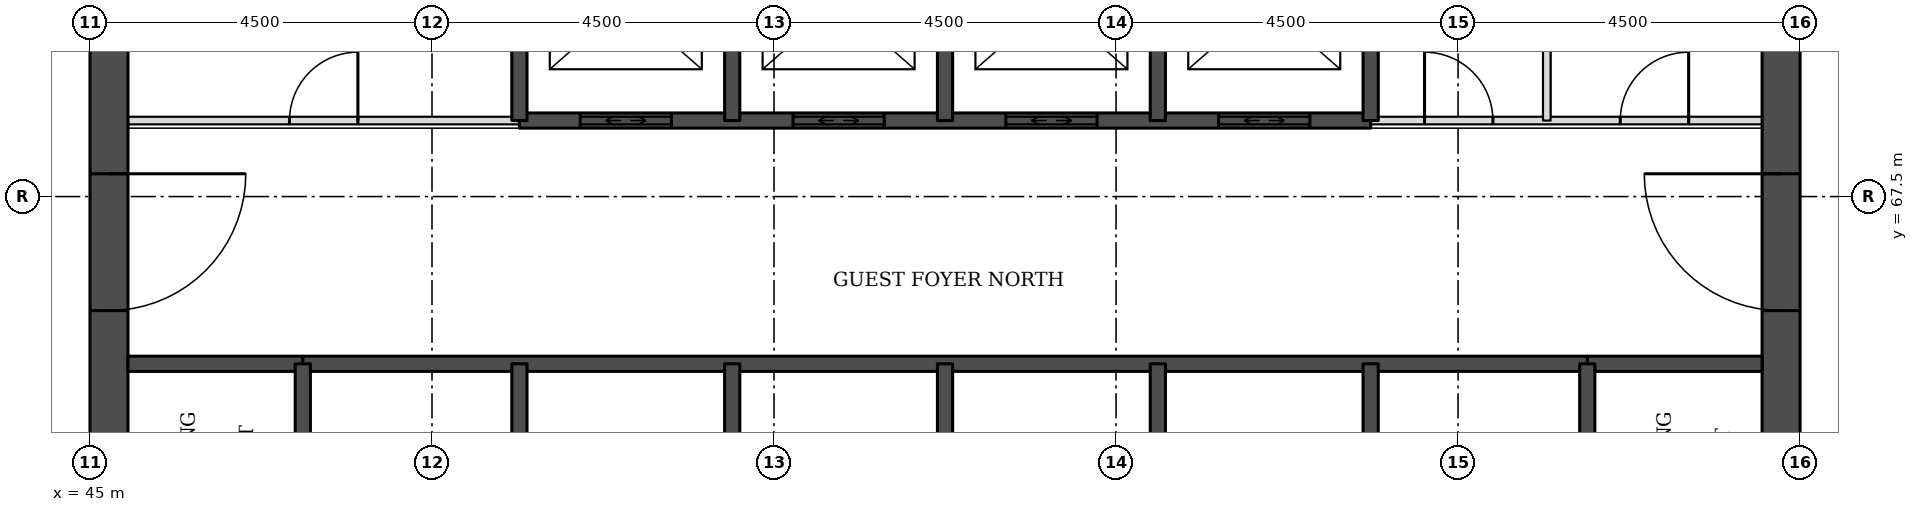
"""IFC4 building model, lengths in metres.
Left out: names, types, materials, properties, quantities, classifications, styles, units other than length and angle.
Written with IfcOpenShell. Run it as: python <this file> out.ifc"""

import sys

from ifc_helpers import new_model, si_unit, direction, frame, frame_2d, origin, place, context, subcontext, project, spatial, rectangle, extrude, element, fill, save


model = new_model("IFC4")
c1 = context("Model", 3, precision=1e-05, world=origin(), true_north=direction((0.0, 1.0)))
c2 = subcontext(c1, "Body", "Model", "MODEL_VIEW")
j1 = project(units=[si_unit("LENGTHUNIT", "METRE"), si_unit("PLANEANGLEUNIT", "RADIAN")], contexts=[c1])
p1 = place(None, origin())
s1 = spatial("IfcSite", under=j1, at=p1, CompositionType="ELEMENT")
p2 = place(p1, origin())
s2 = spatial("IfcBuilding", under=s1, at=p2, CompositionType="ELEMENT")
p3 = place(p2, frame((0.0, 0.0, 62.7)))
s3 = spatial("IfcBuildingStorey", under=s2, at=p3, CompositionType="ELEMENT", Elevation=62.7)
p4 = place(p3, frame((45.25, 49.5, 0.0), z_axis=(0.0, 0.0, 1.0), x_axis=(0.0, 1.0, 0.0)))
e1 = element("IfcWall", 1, at=p4, inside=s3, PredefinedType="SHEAR", context=c2, shape_type="SweptSolid", body=[
    extrude(rectangle(XDim=22.5, YDim=0.5, at=frame_2d((11.25, 0.0))), origin(), (0.0, 0.0, 1.0), 3.3),
])
p5 = place(p4, frame((4.2, 0.0, 0.0)))
e2 = element("IfcOpeningElement", 2, at=p5, cuts=e1, PredefinedType="OPENING", context=c2, shape_type="SweptSolid", body=[
    extrude(rectangle(XDim=1.8, YDim=2.1, at=frame_2d((0.9, 1.05))), frame((0.0, 0.26, 0.0), z_axis=(0.0, -1.0, 0.0), x_axis=(1.0, 0.0, 0.0)), (0.0, 0.0, 1.0), 0.52),
])
p6 = place(p4, frame((6.9, 0.0, 0.0)))
e3 = element("IfcOpeningElement", 3, at=p6, cuts=e1, PredefinedType="OPENING", context=c2, shape_type="SweptSolid", body=[
    extrude(rectangle(XDim=1.1, YDim=2.1, at=frame_2d((0.55, 1.05))), frame((0.0, 0.26, 0.0), z_axis=(0.0, -1.0, 0.0), x_axis=(1.0, 0.0, 0.0)), (0.0, 0.0, 1.0), 0.52),
])
p7 = place(p4, frame((13.6, 0.0, 0.0)))
e4 = element("IfcOpeningElement", 4, at=p7, cuts=e1, PredefinedType="OPENING", context=c2, shape_type="SweptSolid", body=[
    extrude(rectangle(XDim=1.1, YDim=2.1, at=frame_2d((0.55, 1.05))), frame((0.0, 0.26, 0.0), z_axis=(0.0, -1.0, 0.0), x_axis=(1.0, 0.0, 0.0)), (0.0, 0.0, 1.0), 0.52),
])
p8 = place(p4, frame((16.5, 0.0, 0.0)))
e5 = element("IfcOpeningElement", 5, at=p8, cuts=e1, PredefinedType="OPENING", context=c2, shape_type="SweptSolid", body=[
    extrude(rectangle(XDim=1.8, YDim=2.1, at=frame_2d((0.9, 1.05))), frame((0.0, 0.26, 0.0), z_axis=(0.0, -1.0, 0.0), x_axis=(1.0, 0.0, 0.0)), (0.0, 0.0, 1.0), 0.52),
])
p9 = place(p3, frame((67.25, 49.5, 0.0), z_axis=(0.0, 0.0, 1.0), x_axis=(0.0, 1.0, 0.0)))
e6 = element("IfcWall", 6, at=p9, inside=s3, PredefinedType="SHEAR", context=c2, shape_type="SweptSolid", body=[
    extrude(rectangle(XDim=22.5, YDim=0.5, at=frame_2d((11.25, 0.0))), origin(), (0.0, 0.0, 1.0), 3.3),
])
p10 = place(p9, frame((4.2, 0.0, 0.0)))
e7 = element("IfcOpeningElement", 7, at=p10, cuts=e6, PredefinedType="OPENING", context=c2, shape_type="SweptSolid", body=[
    extrude(rectangle(XDim=1.8, YDim=2.1, at=frame_2d((0.9, 1.05))), frame((0.0, 0.26, 0.0), z_axis=(0.0, -1.0, 0.0), x_axis=(1.0, 0.0, 0.0)), (0.0, 0.0, 1.0), 0.52),
])
p11 = place(p9, frame((6.9, 0.0, 0.0)))
e8 = element("IfcOpeningElement", 8, at=p11, cuts=e6, PredefinedType="OPENING", context=c2, shape_type="SweptSolid", body=[
    extrude(rectangle(XDim=1.1, YDim=2.1, at=frame_2d((0.55, 1.05))), frame((0.0, 0.26, 0.0), z_axis=(0.0, -1.0, 0.0), x_axis=(1.0, 0.0, 0.0)), (0.0, 0.0, 1.0), 0.52),
])
p12 = place(p9, frame((13.6, 0.0, 0.0)))
e9 = element("IfcOpeningElement", 9, at=p12, cuts=e6, PredefinedType="OPENING", context=c2, shape_type="SweptSolid", body=[
    extrude(rectangle(XDim=1.1, YDim=2.1, at=frame_2d((0.55, 1.05))), frame((0.0, 0.26, 0.0), z_axis=(0.0, -1.0, 0.0), x_axis=(1.0, 0.0, 0.0)), (0.0, 0.0, 1.0), 0.52),
])
p13 = place(p9, frame((16.5, 0.0, 0.0)))
e10 = element("IfcOpeningElement", 10, at=p13, cuts=e6, PredefinedType="OPENING", context=c2, shape_type="SweptSolid", body=[
    extrude(rectangle(XDim=1.8, YDim=2.1, at=frame_2d((0.9, 1.05))), frame((0.0, 0.26, 0.0), z_axis=(0.0, -1.0, 0.0), x_axis=(1.0, 0.0, 0.0)), (0.0, 0.0, 1.0), 0.52),
])
for number, where, z_axis, x_axis in (
    (11, (45.5, 65.3, 0.0), (0.0, 0.0, 1.0), (1.0, 0.0, 0.0)),
    (12, (64.7, 65.3, 0.0), (0.0, 0.0, 1.0), (1.0, 0.0, 0.0)),
):
    element("IfcWall", number, at=place(p3, frame(where, z_axis=z_axis, x_axis=x_axis)), inside=s3, PredefinedType="SOLIDWALL", context=c2, shape_type="SweptSolid", body=[
        extrude(rectangle(XDim=2.3, YDim=0.2, at=frame_2d((1.15, 0.0))), origin(), (0.0, 0.0, 1.0), 3.08),
    ])
p14 = place(p3, frame((47.8, 65.3, 0.0), z_axis=(0.0, 0.0, 1.0), x_axis=(1.0, 0.0, 0.0)))
e13 = element("IfcWall", 13, at=p14, inside=s3, PredefinedType="SOLIDWALL", context=c2, shape_type="SweptSolid", body=[
    extrude(rectangle(XDim=16.9, YDim=0.2, at=frame_2d((8.45, 0.0))), origin(), (0.0, 0.0, 1.0), 3.08),
])
p15 = place(p3, frame((45.5, 68.5, 0.0), z_axis=(0.0, 0.0, 1.0), x_axis=(1.0, 0.0, 0.0)))
e14 = element("IfcWall", 14, at=p15, inside=s3, PredefinedType="PARTITIONING", context=c2, shape_type="SweptSolid", body=[
    extrude(rectangle(XDim=5.15, YDim=0.1, at=frame_2d((2.575, 0.0))), origin(), (0.0, 0.0, 1.0), 3.08),
])
p16 = place(p15, frame((2.125, 0.0, 0.0)))
e15 = element("IfcOpeningElement", 15, at=p16, cuts=e14, PredefinedType="OPENING", context=c2, shape_type="SweptSolid", body=[
    extrude(rectangle(XDim=0.9, YDim=2.1, at=frame_2d((0.45, 1.05))), frame((0.0, 0.06, 0.0), z_axis=(0.0, -1.0, 0.0), x_axis=(1.0, 0.0, 0.0)), (0.0, 0.0, 1.0), 0.12),
])
p17 = place(p3, frame((61.85, 68.5, 0.0), z_axis=(0.0, 0.0, 1.0), x_axis=(1.0, 0.0, 0.0)))
e16 = element("IfcWall", 16, at=p17, inside=s3, PredefinedType="PARTITIONING", context=c2, shape_type="SweptSolid", body=[
    extrude(rectangle(XDim=5.15, YDim=0.1, at=frame_2d((2.575, 0.0))), origin(), (0.0, 0.0, 1.0), 3.08),
])
p18 = place(p17, frame((3.284, 0.0, 0.0)))
e17 = element("IfcOpeningElement", 17, at=p18, cuts=e16, PredefinedType="OPENING", context=c2, shape_type="SweptSolid", body=[
    extrude(rectangle(XDim=0.9, YDim=2.1, at=frame_2d((0.45, 1.05))), frame((0.0, 0.06, 0.0), z_axis=(0.0, -1.0, 0.0), x_axis=(1.0, 0.0, 0.0)), (0.0, 0.0, 1.0), 0.12),
])
p19 = place(p17, frame((0.709, 0.0, 0.0)))
e18 = element("IfcOpeningElement", 18, at=p19, cuts=e16, PredefinedType="OPENING", context=c2, shape_type="SweptSolid", body=[
    extrude(rectangle(XDim=0.9, YDim=2.1, at=frame_2d((0.45, 1.05))), frame((0.0, 0.06, 0.0), z_axis=(0.0, -1.0, 0.0), x_axis=(1.0, 0.0, 0.0)), (0.0, 0.0, 1.0), 0.12),
])
p20 = place(p3, frame((50.65, 68.5, 0.0), z_axis=(0.0, 0.0, 1.0), x_axis=(1.0, 0.0, 0.0)))
e19 = element("IfcWall", 19, at=p20, inside=s3, PredefinedType="SOLIDWALL", context=c2, shape_type="SweptSolid", body=[
    extrude(rectangle(XDim=11.2, YDim=0.2, at=frame_2d((5.6, 0.0))), origin(), (0.0, 0.0, 1.0), 3.08),
])
p21 = place(p20, frame((0.8, 0.0, 0.0)))
e20 = element("IfcOpeningElement", 20, at=p21, cuts=e19, PredefinedType="OPENING", context=c2, shape_type="SweptSolid", body=[
    extrude(rectangle(XDim=1.2, YDim=2.1, at=frame_2d((0.6, 1.05))), frame((0.0, 0.11, 0.0), z_axis=(0.0, -1.0, 0.0), x_axis=(1.0, 0.0, 0.0)), (0.0, 0.0, 1.0), 0.22),
])
p22 = place(p20, frame((3.6, 0.0, 0.0)))
e21 = element("IfcOpeningElement", 21, at=p22, cuts=e19, PredefinedType="OPENING", context=c2, shape_type="SweptSolid", body=[
    extrude(rectangle(XDim=1.2, YDim=2.1, at=frame_2d((0.6, 1.05))), frame((0.0, 0.11, 0.0), z_axis=(0.0, -1.0, 0.0), x_axis=(1.0, 0.0, 0.0)), (0.0, 0.0, 1.0), 0.22),
])
p23 = place(p20, frame((6.4, 0.0, 0.0)))
e22 = element("IfcOpeningElement", 22, at=p23, cuts=e19, PredefinedType="OPENING", context=c2, shape_type="SweptSolid", body=[
    extrude(rectangle(XDim=1.2, YDim=2.1, at=frame_2d((0.6, 1.05))), frame((0.0, 0.11, 0.0), z_axis=(0.0, -1.0, 0.0), x_axis=(1.0, 0.0, 0.0)), (0.0, 0.0, 1.0), 0.22),
])
p24 = place(p20, frame((9.2, 0.0, 0.0)))
e23 = element("IfcOpeningElement", 23, at=p24, cuts=e19, PredefinedType="OPENING", context=c2, shape_type="SweptSolid", body=[
    extrude(rectangle(XDim=1.2, YDim=2.1, at=frame_2d((0.6, 1.05))), frame((0.0, 0.11, 0.0), z_axis=(0.0, -1.0, 0.0), x_axis=(1.0, 0.0, 0.0)), (0.0, 0.0, 1.0), 0.22),
])
p25 = place(p3, frame((47.8, 62.0, 0.0), z_axis=(0.0, 0.0, 1.0), x_axis=(0.0, 1.0, 0.0)))
e24 = element("IfcWall", 24, at=p25, inside=s3, PredefinedType="SOLIDWALL", context=c2, shape_type="SweptSolid", body=[
    extrude(rectangle(XDim=3.3, YDim=0.2, at=frame_2d((1.65, 0.0))), origin(), (0.0, 0.0, 1.0), 3.08),
])
p26 = place(p25, frame((1.1, 0.0, 0.0)))
e25 = element("IfcOpeningElement", 25, at=p26, cuts=e24, PredefinedType="OPENING", context=c2, shape_type="SweptSolid", body=[
    extrude(rectangle(XDim=1.1, YDim=2.1, at=frame_2d((0.55, 1.05))), frame((0.0, 0.11, 0.0), z_axis=(0.0, -1.0, 0.0), x_axis=(1.0, 0.0, 0.0)), (0.0, 0.0, 1.0), 0.22),
])
p27 = place(p3, frame((50.65, 62.0, 0.0), z_axis=(0.0, 0.0, 1.0), x_axis=(0.0, 1.0, 0.0)))
e26 = element("IfcWall", 26, at=p27, inside=s3, PredefinedType="SOLIDWALL", context=c2, shape_type="SweptSolid", body=[
    extrude(rectangle(XDim=3.3, YDim=0.2, at=frame_2d((1.65, 0.0))), origin(), (0.0, 0.0, 1.0), 3.08),
])
p28 = place(p3, frame((50.65, 68.5, 0.0), z_axis=(0.0, 0.0, 1.0), x_axis=(0.0, 1.0, 0.0)))
e27 = element("IfcWall", 27, at=p28, inside=s3, PredefinedType="SOLIDWALL", context=c2, shape_type="SweptSolid", body=[
    extrude(rectangle(XDim=3.0, YDim=0.2, at=frame_2d((1.5, 0.0))), origin(), (0.0, 0.0, 1.0), 3.08),
])
p29 = place(p3, frame((53.45, 62.5, 0.0), z_axis=(0.0, 0.0, 1.0), x_axis=(0.0, 1.0, 0.0)))
e28 = element("IfcWall", 28, at=p29, inside=s3, PredefinedType="SOLIDWALL", context=c2, shape_type="SweptSolid", body=[
    extrude(rectangle(XDim=2.8, YDim=0.2, at=frame_2d((1.4, 0.0))), origin(), (0.0, 0.0, 1.0), 3.08),
])
p30 = place(p3, frame((53.45, 68.5, 0.0), z_axis=(0.0, 0.0, 1.0), x_axis=(0.0, 1.0, 0.0)))
e29 = element("IfcWall", 29, at=p30, inside=s3, PredefinedType="SOLIDWALL", context=c2, shape_type="SweptSolid", body=[
    extrude(rectangle(XDim=3.0, YDim=0.2, at=frame_2d((1.5, 0.0))), origin(), (0.0, 0.0, 1.0), 3.08),
])
p31 = place(p3, frame((56.25, 62.5, 0.0), z_axis=(0.0, 0.0, 1.0), x_axis=(0.0, 1.0, 0.0)))
e30 = element("IfcWall", 30, at=p31, inside=s3, PredefinedType="SOLIDWALL", context=c2, shape_type="SweptSolid", body=[
    extrude(rectangle(XDim=2.8, YDim=0.2, at=frame_2d((1.4, 0.0))), origin(), (0.0, 0.0, 1.0), 3.08),
])
p32 = place(p3, frame((56.25, 68.5, 0.0), z_axis=(0.0, 0.0, 1.0), x_axis=(0.0, 1.0, 0.0)))
e31 = element("IfcWall", 31, at=p32, inside=s3, PredefinedType="SOLIDWALL", context=c2, shape_type="SweptSolid", body=[
    extrude(rectangle(XDim=3.0, YDim=0.2, at=frame_2d((1.5, 0.0))), origin(), (0.0, 0.0, 1.0), 3.08),
])
p33 = place(p3, frame((59.05, 62.5, 0.0), z_axis=(0.0, 0.0, 1.0), x_axis=(0.0, 1.0, 0.0)))
e32 = element("IfcWall", 32, at=p33, inside=s3, PredefinedType="SOLIDWALL", context=c2, shape_type="SweptSolid", body=[
    extrude(rectangle(XDim=2.8, YDim=0.2, at=frame_2d((1.4, 0.0))), origin(), (0.0, 0.0, 1.0), 3.08),
])
p34 = place(p3, frame((59.05, 68.5, 0.0), z_axis=(0.0, 0.0, 1.0), x_axis=(0.0, 1.0, 0.0)))
e33 = element("IfcWall", 33, at=p34, inside=s3, PredefinedType="SOLIDWALL", context=c2, shape_type="SweptSolid", body=[
    extrude(rectangle(XDim=3.0, YDim=0.2, at=frame_2d((1.5, 0.0))), origin(), (0.0, 0.0, 1.0), 3.08),
])
p35 = place(p3, frame((61.85, 62.0, 0.0), z_axis=(0.0, 0.0, 1.0), x_axis=(0.0, 1.0, 0.0)))
e34 = element("IfcWall", 34, at=p35, inside=s3, PredefinedType="SOLIDWALL", context=c2, shape_type="SweptSolid", body=[
    extrude(rectangle(XDim=3.3, YDim=0.2, at=frame_2d((1.65, 0.0))), origin(), (0.0, 0.0, 1.0), 3.08),
])
p36 = place(p3, frame((61.85, 68.5, 0.0), z_axis=(0.0, 0.0, 1.0), x_axis=(0.0, 1.0, 0.0)))
e35 = element("IfcWall", 35, at=p36, inside=s3, PredefinedType="SOLIDWALL", context=c2, shape_type="SweptSolid", body=[
    extrude(rectangle(XDim=3.0, YDim=0.2, at=frame_2d((1.5, 0.0))), origin(), (0.0, 0.0, 1.0), 3.08),
])
p37 = place(p3, frame((64.167, 68.5, 0.0), z_axis=(0.0, 0.0, 1.0), x_axis=(0.0, 1.0, 0.0)))
e36 = element("IfcWall", 36, at=p37, inside=s3, PredefinedType="PARTITIONING", context=c2, shape_type="SweptSolid", body=[
    extrude(rectangle(XDim=3.0, YDim=0.1, at=frame_2d((1.5, 0.0))), origin(), (0.0, 0.0, 1.0), 3.08),
])
p38 = place(p3, frame((64.7, 62.0, 0.0), z_axis=(0.0, 0.0, 1.0), x_axis=(0.0, 1.0, 0.0)))
e37 = element("IfcWall", 37, at=p38, inside=s3, PredefinedType="SOLIDWALL", context=c2, shape_type="SweptSolid", body=[
    extrude(rectangle(XDim=3.3, YDim=0.2, at=frame_2d((1.65, 0.0))), origin(), (0.0, 0.0, 1.0), 3.08),
])
p39 = place(p38, frame((1.1, 0.0, 0.0)))
e38 = element("IfcOpeningElement", 38, at=p39, cuts=e37, PredefinedType="OPENING", context=c2, shape_type="SweptSolid", body=[
    extrude(rectangle(XDim=1.1, YDim=2.1, at=frame_2d((0.55, 1.05))), frame((0.0, 0.11, 0.0), z_axis=(0.0, -1.0, 0.0), x_axis=(1.0, 0.0, 0.0)), (0.0, 0.0, 1.0), 0.22),
])
p40 = place(p21, origin())
e39 = element("IfcDoor", 39, at=p40, inside=s3, OperationType="DOUBLE_DOOR_SLIDING", PredefinedType="DOOR", context=c2, shape_type="SweptSolid", body=[
    extrude(rectangle(XDim=1.2, YDim=2.1, at=frame_2d((0.6, 1.05))), frame((0.0, 0.025, 0.0), z_axis=(0.0, -1.0, 0.0), x_axis=(1.0, 0.0, 0.0)), (0.0, 0.0, 1.0), 0.05),
])
fill(e20, e39)
p41 = place(p22, origin())
e40 = element("IfcDoor", 40, at=p41, inside=s3, OperationType="DOUBLE_DOOR_SLIDING", PredefinedType="DOOR", context=c2, shape_type="SweptSolid", body=[
    extrude(rectangle(XDim=1.2, YDim=2.1, at=frame_2d((0.6, 1.05))), frame((0.0, 0.025, 0.0), z_axis=(0.0, -1.0, 0.0), x_axis=(1.0, 0.0, 0.0)), (0.0, 0.0, 1.0), 0.05),
])
fill(e21, e40)
p42 = place(p23, origin())
e41 = element("IfcDoor", 41, at=p42, inside=s3, OperationType="DOUBLE_DOOR_SLIDING", PredefinedType="DOOR", context=c2, shape_type="SweptSolid", body=[
    extrude(rectangle(XDim=1.2, YDim=2.1, at=frame_2d((0.6, 1.05))), frame((0.0, 0.025, 0.0), z_axis=(0.0, -1.0, 0.0), x_axis=(1.0, 0.0, 0.0)), (0.0, 0.0, 1.0), 0.05),
])
fill(e22, e41)
p43 = place(p24, origin())
e42 = element("IfcDoor", 42, at=p43, inside=s3, OperationType="DOUBLE_DOOR_SLIDING", PredefinedType="DOOR", context=c2, shape_type="SweptSolid", body=[
    extrude(rectangle(XDim=1.2, YDim=2.1, at=frame_2d((0.6, 1.05))), frame((0.0, 0.025, 0.0), z_axis=(0.0, -1.0, 0.0), x_axis=(1.0, 0.0, 0.0)), (0.0, 0.0, 1.0), 0.05),
])
fill(e23, e42)
p44 = place(p8, frame((1.8, 0.0, 0.0), z_axis=(0.0, 0.0, 1.0), x_axis=(-1.0, 0.0, 0.0)))
e43 = element("IfcDoor", 43, at=p44, inside=s3, OperationType="SINGLE_SWING_LEFT", PredefinedType="DOOR", context=c2, shape_type="SweptSolid", body=[
    extrude(rectangle(XDim=1.8, YDim=2.1, at=frame_2d((0.9, 1.05))), frame((0.0, 0.025, 0.0), z_axis=(0.0, -1.0, 0.0), x_axis=(1.0, 0.0, 0.0)), (0.0, 0.0, 1.0), 0.05),
])
fill(e5, e43)
p45 = place(p13, origin())
e44 = element("IfcDoor", 44, at=p45, inside=s3, OperationType="SINGLE_SWING_RIGHT", PredefinedType="DOOR", context=c2, shape_type="SweptSolid", body=[
    extrude(rectangle(XDim=1.8, YDim=2.1, at=frame_2d((0.9, 1.05))), frame((0.0, 0.025, 0.0), z_axis=(0.0, -1.0, 0.0), x_axis=(1.0, 0.0, 0.0)), (0.0, 0.0, 1.0), 0.05),
])
fill(e10, e44)
p46 = place(p18, origin())
e45 = element("IfcDoor", 45, at=p46, inside=s3, OperationType="SINGLE_SWING_RIGHT", PredefinedType="DOOR", context=c2, shape_type="SweptSolid", body=[
    extrude(rectangle(XDim=0.9, YDim=2.1, at=frame_2d((0.45, 1.05))), frame((0.0, 0.025, 0.0), z_axis=(0.0, -1.0, 0.0), x_axis=(1.0, 0.0, 0.0)), (0.0, 0.0, 1.0), 0.05),
])
fill(e17, e45)
p47 = place(p19, origin())
e46 = element("IfcDoor", 46, at=p47, inside=s3, OperationType="SINGLE_SWING_LEFT", PredefinedType="DOOR", context=c2, shape_type="SweptSolid", body=[
    extrude(rectangle(XDim=0.9, YDim=2.1, at=frame_2d((0.45, 1.05))), frame((0.0, 0.025, 0.0), z_axis=(0.0, -1.0, 0.0), x_axis=(1.0, 0.0, 0.0)), (0.0, 0.0, 1.0), 0.05),
])
fill(e18, e46)
p48 = place(p16, origin())
e47 = element("IfcDoor", 47, at=p48, inside=s3, OperationType="SINGLE_SWING_RIGHT", PredefinedType="DOOR", context=c2, shape_type="SweptSolid", body=[
    extrude(rectangle(XDim=0.9, YDim=2.1, at=frame_2d((0.45, 1.05))), frame((0.0, 0.025, 0.0), z_axis=(0.0, -1.0, 0.0), x_axis=(1.0, 0.0, 0.0)), (0.0, 0.0, 1.0), 0.05),
])
fill(e15, e47)
save(model, sys.argv[1])
